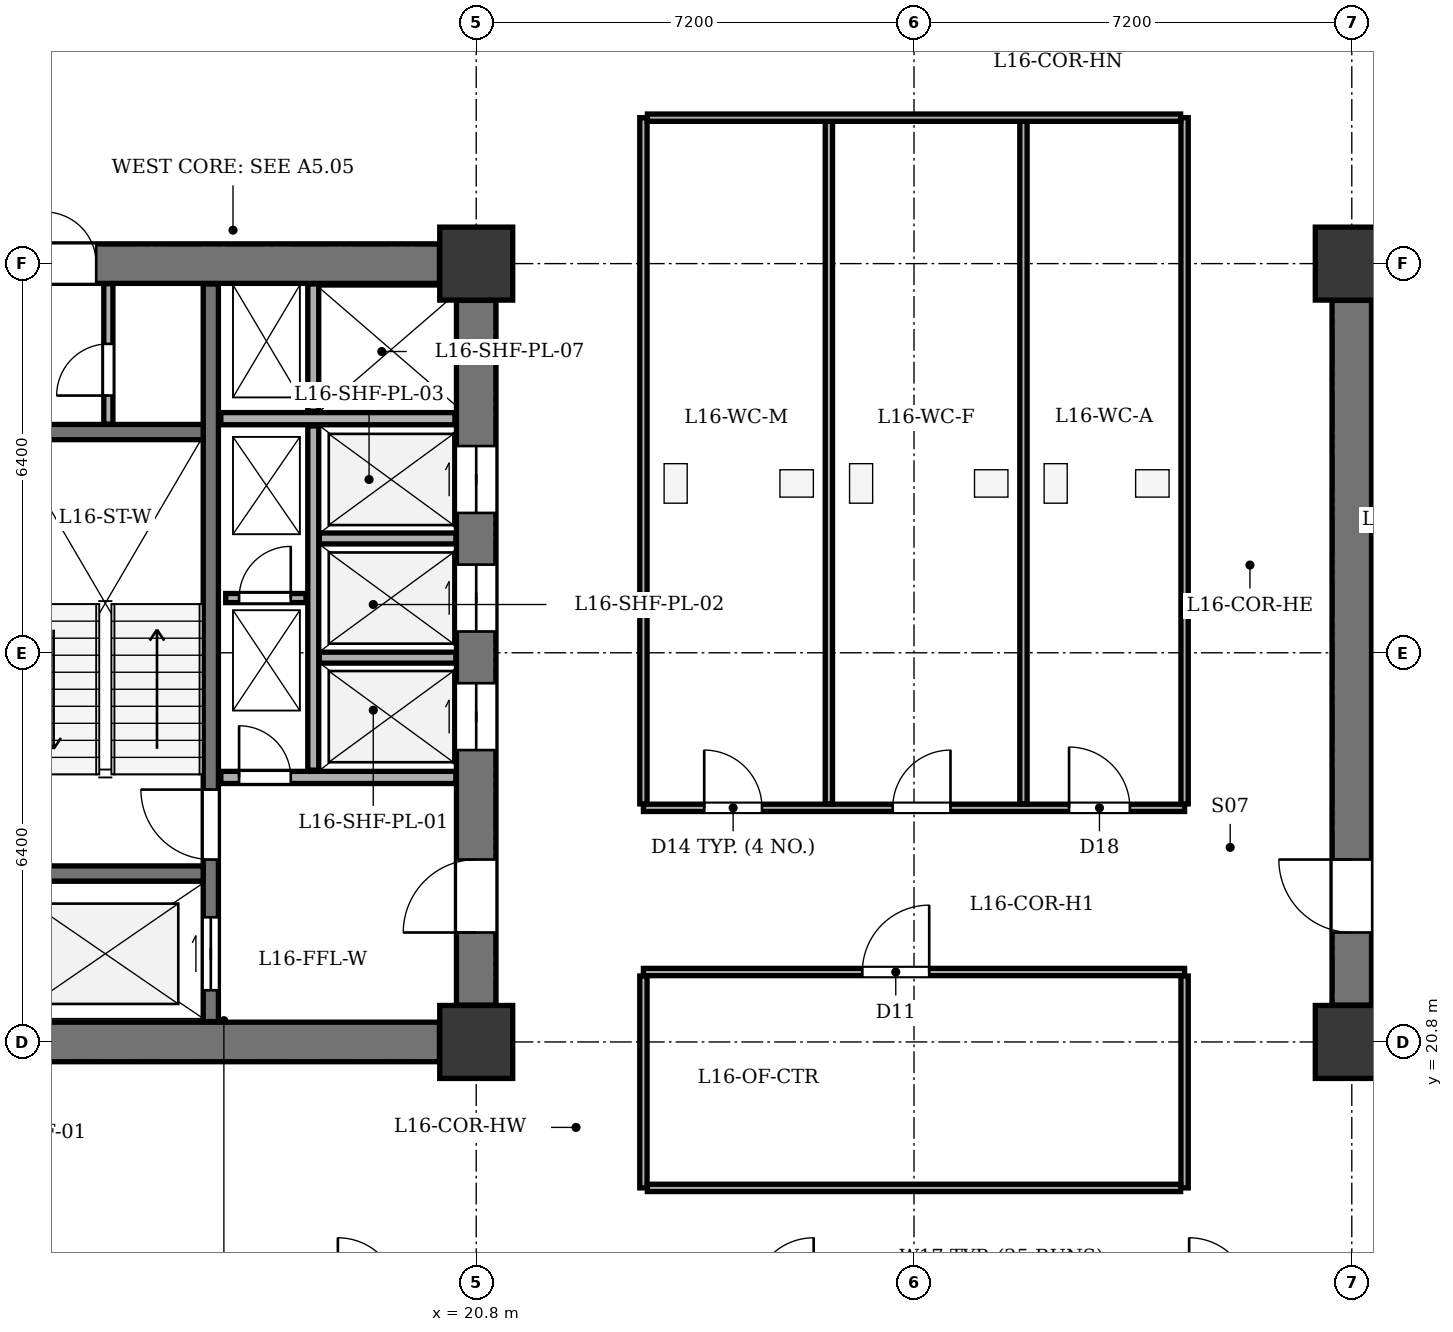
"""IFC4 building model, lengths in metres.
Left out: names, types, materials, properties, quantities, classifications, styles, units other than length and angle.
Written with IfcOpenShell. Run it as: python <this file> out.ifc"""

import sys

from ifc_helpers import new_model, si_unit, direction, frame, frame_2d, origin, origin_2d, place, context, subcontext, project, spatial, rectangle, extrude, element, fill, save


model = new_model("IFC4")
c1 = context("Model", 3, precision=1e-05, world=origin(), true_north=direction((0.0, 1.0)))
c2 = subcontext(c1, "Body", "Model", "MODEL_VIEW")
j1 = project(units=[si_unit("LENGTHUNIT", "METRE"), si_unit("PLANEANGLEUNIT", "RADIAN")], contexts=[c1])
p1 = place(None, origin())
s1 = spatial("IfcSite", under=j1, at=p1, CompositionType="ELEMENT")
p2 = place(p1, origin())
s2 = spatial("IfcBuilding", under=s1, at=p2, CompositionType="ELEMENT")
p3 = place(p2, frame((0.0, 0.0, 67.2)))
s3 = spatial("IfcBuildingStorey", under=s2, at=p3, CompositionType="ELEMENT", Elevation=67.2)
for number, where, z_axis, x_axis in (
    (1, (20.8, 20.8, 0.0), (0.0, 0.0, 1.0), (1.0, 0.0, 0.0)),
    (2, (20.8, 33.6, 0.0), (0.0, 0.0, 1.0), (1.0, 0.0, 0.0)),
    (3, (35.2, 20.8, 0.0), (0.0, 0.0, 1.0), (1.0, 0.0, 0.0)),
    (4, (35.2, 33.6, 0.0), (0.0, 0.0, 1.0), (1.0, 0.0, 0.0)),
):
    element("IfcColumn", number, at=place(p3, frame(where, z_axis=z_axis, x_axis=x_axis)), inside=s3, PredefinedType="COLUMN", context=c2, shape_type="SweptSolid", body=[
        extrude(rectangle(XDim=1.2, YDim=1.2, at=origin_2d()), origin(), (0.0, 0.0, 1.0), 3.9),
    ])
p4 = place(p3, frame((13.405, 20.8, 0.0), z_axis=(0.0, 0.0, 1.0), x_axis=(1.0, 0.0, 0.0)))
e5 = element("IfcWall", 5, at=p4, inside=s3, PredefinedType="SHEAR", context=c2, shape_type="SweptSolid", body=[
    extrude(rectangle(XDim=6.79, YDim=0.65, at=frame_2d((3.395, 0.0))), origin(), (0.0, 0.0, 1.0), 3.45),
])
p5 = place(p3, frame((13.405, 33.6, 0.0), z_axis=(0.0, 0.0, 1.0), x_axis=(1.0, 0.0, 0.0)))
e6 = element("IfcWall", 6, at=p5, inside=s3, PredefinedType="SHEAR", context=c2, shape_type="SweptSolid", body=[
    extrude(rectangle(XDim=6.79, YDim=0.65, at=frame_2d((3.395, 0.0))), origin(), (0.0, 0.0, 1.0), 3.45),
])
p6 = place(p5, frame((0.295, 0.0, 0.0)))
e7 = element("IfcOpeningElement", 7, at=p6, cuts=e6, PredefinedType="OPENING", context=c2, shape_type="SweptSolid", body=[
    extrude(rectangle(XDim=0.85, YDim=2.02, at=frame_2d((0.425, 1.01))), frame((0.0, 0.335, 0.0), z_axis=(0.0, -1.0, 0.0), x_axis=(1.0, 0.0, 0.0)), (0.0, 0.0, 1.0), 0.67),
])
p7 = place(p3, frame((20.8, 21.405, 0.0), z_axis=(0.0, 0.0, 1.0), x_axis=(0.0, 1.0, 0.0)))
e8 = element("IfcWall", 8, at=p7, inside=s3, PredefinedType="SHEAR", context=c2, shape_type="SweptSolid", body=[
    extrude(rectangle(XDim=11.59, YDim=0.65, at=frame_2d((5.795, 0.0))), origin(), (0.0, 0.0, 1.0), 3.45),
])
p8 = place(p7, frame((1.195, 0.0, 0.0)))
e9 = element("IfcOpeningElement", 9, at=p8, cuts=e8, PredefinedType="OPENING", context=c2, shape_type="SweptSolid", body=[
    extrude(rectangle(XDim=1.2, YDim=2.15, at=frame_2d((0.6, 1.075))), frame((0.0, 0.335, 0.0), z_axis=(0.0, -1.0, 0.0), x_axis=(1.0, 0.0, 0.0)), (0.0, 0.0, 1.0), 0.67),
])
p9 = place(p7, frame((4.195, 0.0, 0.0)))
e10 = element("IfcOpeningElement", 10, at=p9, cuts=e8, PredefinedType="OPENING", context=c2, shape_type="SweptSolid", body=[
    extrude(rectangle(XDim=1.1, YDim=2.1, at=frame_2d((0.55, 1.05))), frame((0.0, 0.335, 0.0), z_axis=(0.0, -1.0, 0.0), x_axis=(1.0, 0.0, 0.0)), (0.0, 0.0, 1.0), 0.67),
])
p10 = place(p7, frame((6.145, 0.0, 0.0)))
e11 = element("IfcOpeningElement", 11, at=p10, cuts=e8, PredefinedType="OPENING", context=c2, shape_type="SweptSolid", body=[
    extrude(rectangle(XDim=1.1, YDim=2.1, at=frame_2d((0.55, 1.05))), frame((0.0, 0.335, 0.0), z_axis=(0.0, -1.0, 0.0), x_axis=(1.0, 0.0, 0.0)), (0.0, 0.0, 1.0), 0.67),
])
p11 = place(p7, frame((8.095, 0.0, 0.0)))
e12 = element("IfcOpeningElement", 12, at=p11, cuts=e8, PredefinedType="OPENING", context=c2, shape_type="SweptSolid", body=[
    extrude(rectangle(XDim=1.1, YDim=2.1, at=frame_2d((0.55, 1.05))), frame((0.0, 0.335, 0.0), z_axis=(0.0, -1.0, 0.0), x_axis=(1.0, 0.0, 0.0)), (0.0, 0.0, 1.0), 0.67),
])
p12 = place(p3, frame((16.435, 21.135, 0.0), z_axis=(0.0, 0.0, 1.0), x_axis=(0.0, 1.0, 0.0)))
e13 = element("IfcWall", 13, at=p12, inside=s3, PredefinedType="SHEAR", context=c2, shape_type="SweptSolid", body=[
    extrude(rectangle(XDim=12.13, YDim=0.25, at=frame_2d((6.065, 0.0))), origin(), (0.0, 0.0, 1.0), 3.45),
])
p13 = place(p12, frame((0.515, 0.0, 0.0)))
e14 = element("IfcOpeningElement", 14, at=p13, cuts=e13, PredefinedType="OPENING", context=c2, shape_type="SweptSolid", body=[
    extrude(rectangle(XDim=1.2, YDim=2.15, at=frame_2d((0.6, 1.075))), frame((0.0, 0.135, 0.0), z_axis=(0.0, -1.0, 0.0), x_axis=(1.0, 0.0, 0.0)), (0.0, 0.0, 1.0), 0.27),
])
p14 = place(p12, frame((2.665, 0.0, 0.0)))
e15 = element("IfcOpeningElement", 15, at=p14, cuts=e13, PredefinedType="OPENING", context=c2, shape_type="SweptSolid", body=[
    extrude(rectangle(XDim=1.15, YDim=2.15, at=frame_2d((0.575, 1.075))), frame((0.0, 0.135, 0.0), z_axis=(0.0, -1.0, 0.0), x_axis=(1.0, 0.0, 0.0)), (0.0, 0.0, 1.0), 0.27),
])
for number, where, z_axis, x_axis in (
    (16, (13.135, 23.57, 0.0), (0.0, 0.0, 1.0), (1.0, 0.0, 0.0)),
    (17, (13.135, 30.83, 0.0), (0.0, 0.0, 1.0), (1.0, 0.0, 0.0)),
):
    element("IfcWall", number, at=place(p3, frame(where, z_axis=z_axis, x_axis=x_axis)), inside=s3, PredefinedType="SHEAR", context=c2, shape_type="SweptSolid", body=[
        extrude(rectangle(XDim=3.175, YDim=0.25, at=frame_2d((1.587, 0.0))), origin(), (0.0, 0.0, 1.0), 3.45),
    ])
p15 = place(p3, frame((16.6, 25.15, 0.0), z_axis=(0.0, 0.0, 1.0), x_axis=(1.0, 0.0, 0.0)))
e18 = element("IfcWall", 18, at=p15, inside=s3, PredefinedType="SOLIDWALL", context=c2, shape_type="SweptSolid", body=[
    extrude(rectangle(XDim=3.865, YDim=0.2, at=frame_2d((1.933, 0.0))), origin(), (0.0, 0.0, 1.0), 3.45),
])
p16 = place(p15, frame((0.3, 0.0, 0.0)))
e19 = element("IfcOpeningElement", 19, at=p16, cuts=e18, PredefinedType="OPENING", context=c2, shape_type="SweptSolid", body=[
    extrude(rectangle(XDim=0.85, YDim=2.02, at=frame_2d((0.425, 1.01))), frame((0.0, 0.11, 0.0), z_axis=(0.0, -1.0, 0.0), x_axis=(1.0, 0.0, 0.0)), (0.0, 0.0, 1.0), 0.22),
])
p17 = place(p3, frame((16.6, 31.05, 0.0), z_axis=(0.0, 0.0, 1.0), x_axis=(1.0, 0.0, 0.0)))
e20 = element("IfcWall", 20, at=p17, inside=s3, PredefinedType="SOLIDWALL", context=c2, shape_type="SweptSolid", body=[
    extrude(rectangle(XDim=3.85, YDim=0.2, at=frame_2d((1.925, 0.0))), origin(), (0.0, 0.0, 1.0), 3.45),
])
p18 = place(p3, frame((18.12, 25.27, 0.0), z_axis=(0.0, 0.0, 1.0), x_axis=(0.0, 1.0, 0.0)))
e21 = element("IfcWall", 21, at=p18, inside=s3, PredefinedType="PARTITIONING", context=c2, shape_type="SweptSolid", body=[
    extrude(rectangle(XDim=5.66, YDim=0.18, at=frame_2d((2.83, 0.0))), origin(), (0.0, 0.0, 1.0), 3.45),
])
p19 = place(p3, frame((18.12, 31.17, 0.0), z_axis=(0.0, 0.0, 1.0), x_axis=(0.0, 1.0, 0.0)))
e22 = element("IfcWall", 22, at=p19, inside=s3, PredefinedType="PARTITIONING", context=c2, shape_type="SweptSolid", body=[
    extrude(rectangle(XDim=2.095, YDim=0.18, at=frame_2d((1.047, 0.0))), origin(), (0.0, 0.0, 1.0), 3.45),
])
for number, where, z_axis, x_axis in (
    (23, (18.22, 27.12, 0.0), (0.0, 0.0, 1.0), (1.0, 0.0, 0.0)),
    (24, (18.22, 29.08, 0.0), (0.0, 0.0, 1.0), (1.0, 0.0, 0.0)),
):
    element("IfcWall", number, at=place(p3, frame(where, z_axis=z_axis, x_axis=x_axis)), inside=s3, PredefinedType="PARTITIONING", context=c2, shape_type="SweptSolid", body=[
        extrude(rectangle(XDim=2.245, YDim=0.18, at=frame_2d((1.123, 0.0))), origin(), (0.0, 0.0, 1.0), 3.45),
    ])
p20 = place(p3, frame((35.2, 21.405, 0.0), z_axis=(0.0, 0.0, 1.0), x_axis=(0.0, 1.0, 0.0)))
e25 = element("IfcWall", 25, at=p20, inside=s3, PredefinedType="SHEAR", context=c2, shape_type="SweptSolid", body=[
    extrude(rectangle(XDim=11.59, YDim=0.65, at=frame_2d((5.795, 0.0))), origin(), (0.0, 0.0, 1.0), 3.45),
])
p21 = place(p20, frame((1.195, 0.0, 0.0)))
e26 = element("IfcOpeningElement", 26, at=p21, cuts=e25, PredefinedType="OPENING", context=c2, shape_type="SweptSolid", body=[
    extrude(rectangle(XDim=1.2, YDim=2.15, at=frame_2d((0.6, 1.075))), frame((0.0, 0.335, 0.0), z_axis=(0.0, -1.0, 0.0), x_axis=(1.0, 0.0, 0.0)), (0.0, 0.0, 1.0), 0.67),
])
p22 = place(p3, frame((35.535, 25.15, 0.0), z_axis=(0.0, 0.0, 1.0), x_axis=(1.0, 0.0, 0.0)))
e27 = element("IfcWall", 27, at=p22, inside=s3, PredefinedType="SOLIDWALL", context=c2, shape_type="SweptSolid", body=[
    extrude(rectangle(XDim=3.865, YDim=0.2, at=frame_2d((1.933, 0.0))), origin(), (0.0, 0.0, 1.0), 3.45),
])
for number, where, z_axis, x_axis in (
    (28, (35.535, 27.12, 0.0), (0.0, 0.0, 1.0), (1.0, 0.0, 0.0)),
    (29, (35.535, 29.08, 0.0), (0.0, 0.0, 1.0), (1.0, 0.0, 0.0)),
):
    element("IfcWall", number, at=place(p3, frame(where, z_axis=z_axis, x_axis=x_axis)), inside=s3, PredefinedType="PARTITIONING", context=c2, shape_type="SweptSolid", body=[
        extrude(rectangle(XDim=2.245, YDim=0.18, at=frame_2d((1.123, 0.0))), origin(), (0.0, 0.0, 1.0), 3.45),
    ])
p23 = place(p3, frame((14.75, 30.96, 0.0), z_axis=(0.0, 0.0, 1.0), x_axis=(0.0, 1.0, 0.0)))
e30 = element("IfcWall", 30, at=p23, inside=s3, PredefinedType="PARTITIONING", context=c2, shape_type="SweptSolid", body=[
    extrude(rectangle(XDim=2.31, YDim=0.15, at=frame_2d((1.155, 0.0))), origin(), (0.0, 0.0, 1.0), 3.45),
])
p24 = place(p23, frame((0.47, 0.0, 0.0)))
e31 = element("IfcOpeningElement", 31, at=p24, cuts=e30, PredefinedType="OPENING", context=c2, shape_type="SweptSolid", body=[
    extrude(rectangle(XDim=0.85, YDim=2.02, at=frame_2d((0.425, 1.01))), frame((0.0, 0.085, 0.0), z_axis=(0.0, -1.0, 0.0), x_axis=(1.0, 0.0, 0.0)), (0.0, 0.0, 1.0), 0.17),
])
p25 = place(p3, frame((16.68, 28.1, 0.0), z_axis=(0.0, 0.0, 1.0), x_axis=(1.0, 0.0, 0.0)))
e32 = element("IfcWall", 32, at=p25, inside=s3, PredefinedType="PARTITIONING", context=c2, shape_type="SweptSolid", body=[
    extrude(rectangle(XDim=1.32, YDim=0.15, at=frame_2d((0.66, 0.0))), origin(), (0.0, 0.0, 1.0), 3.45),
])
p26 = place(p25, frame((0.22, 0.0, 0.0)))
e33 = element("IfcOpeningElement", 33, at=p26, cuts=e32, PredefinedType="OPENING", context=c2, shape_type="SweptSolid", body=[
    extrude(rectangle(XDim=0.85, YDim=2.02, at=frame_2d((0.425, 1.01))), frame((0.0, 0.085, 0.0), z_axis=(0.0, -1.0, 0.0), x_axis=(1.0, 0.0, 0.0)), (0.0, 0.0, 1.0), 0.17),
])
p27 = place(p3, frame((23.55, 24.65, 0.0), z_axis=(0.0, 0.0, 1.0), x_axis=(1.0, 0.0, 0.0)))
e34 = element("IfcWall", 34, at=p27, inside=s3, PredefinedType="PARTITIONING", context=c2, shape_type="SweptSolid", body=[
    extrude(rectangle(XDim=8.9, YDim=0.12, at=frame_2d((4.45, 0.0))), origin(), (0.0, 0.0, 1.0), 2.885),
])
p28 = place(p27, frame((1.0, 0.0, 0.0)))
e35 = element("IfcOpeningElement", 35, at=p28, cuts=e34, PredefinedType="OPENING", context=c2, shape_type="SweptSolid", body=[
    extrude(rectangle(XDim=0.95, YDim=2.1, at=frame_2d((0.475, 1.05))), frame((0.0, 0.07, 0.0), z_axis=(0.0, -1.0, 0.0), x_axis=(1.0, 0.0, 0.0)), (0.0, 0.0, 1.0), 0.14),
])
p29 = place(p27, frame((4.1, 0.0, 0.0)))
e36 = element("IfcOpeningElement", 36, at=p29, cuts=e34, PredefinedType="OPENING", context=c2, shape_type="SweptSolid", body=[
    extrude(rectangle(XDim=0.95, YDim=2.1, at=frame_2d((0.475, 1.05))), frame((0.0, 0.07, 0.0), z_axis=(0.0, -1.0, 0.0), x_axis=(1.0, 0.0, 0.0)), (0.0, 0.0, 1.0), 0.14),
])
p30 = place(p27, frame((7.0, 0.0, 0.0)))
e37 = element("IfcOpeningElement", 37, at=p30, cuts=e34, PredefinedType="OPENING", context=c2, shape_type="SweptSolid", body=[
    extrude(rectangle(XDim=1.0, YDim=2.1, at=frame_2d((0.5, 1.05))), frame((0.0, 0.07, 0.0), z_axis=(0.0, -1.0, 0.0), x_axis=(1.0, 0.0, 0.0)), (0.0, 0.0, 1.0), 0.14),
])
for number, where, z_axis, x_axis in (
    (38, (23.55, 24.715, 0.0), (0.0, 0.0, 1.0), (0.0, 1.0, 0.0)),
    (39, (32.45, 24.715, 0.0), (0.0, 0.0, 1.0), (0.0, 1.0, 0.0)),
    (40, (26.6, 24.715, 0.0), (0.0, 0.0, 1.0), (0.0, 1.0, 0.0)),
):
    element("IfcWall", number, at=place(p3, frame(where, z_axis=z_axis, x_axis=x_axis)), inside=s3, PredefinedType="PARTITIONING", context=c2, shape_type="SweptSolid", body=[
        extrude(rectangle(XDim=11.285, YDim=0.12, at=frame_2d((5.643, 0.0))), origin(), (0.0, 0.0, 1.0), 3.45),
    ])
p31 = place(p3, frame((29.8, 24.715, 0.0), z_axis=(0.0, 0.0, 1.0), x_axis=(0.0, 1.0, 0.0)))
e41 = element("IfcWall", 41, at=p31, inside=s3, PredefinedType="PARTITIONING", context=c2, shape_type="SweptSolid", body=[
    extrude(rectangle(XDim=11.285, YDim=0.12, at=frame_2d((5.643, 0.0))), origin(), (0.0, 0.0, 1.0), 2.885),
])
p32 = place(p3, frame((23.615, 36.0, 0.0), z_axis=(0.0, 0.0, 1.0), x_axis=(1.0, 0.0, 0.0)))
e42 = element("IfcWall", 42, at=p32, inside=s3, PredefinedType="PARTITIONING", context=c2, shape_type="SweptSolid", body=[
    extrude(rectangle(XDim=8.77, YDim=0.12, at=frame_2d((4.385, 0.0))), origin(), (0.0, 0.0, 1.0), 3.45),
])
p33 = place(p3, frame((23.55, 21.95, 0.0), z_axis=(0.0, 0.0, 1.0), x_axis=(1.0, 0.0, 0.0)))
e43 = element("IfcWall", 43, at=p33, inside=s3, PredefinedType="PARTITIONING", context=c2, shape_type="SweptSolid", body=[
    extrude(rectangle(XDim=8.9, YDim=0.12, at=frame_2d((4.45, 0.0))), origin(), (0.0, 0.0, 1.0), 2.885),
])
p34 = place(p33, frame((3.6, 0.0, 0.0)))
e44 = element("IfcOpeningElement", 44, at=p34, cuts=e43, PredefinedType="OPENING", context=c2, shape_type="SweptSolid", body=[
    extrude(rectangle(XDim=1.1, YDim=2.15, at=frame_2d((0.55, 1.075))), frame((0.0, 0.07, 0.0), z_axis=(0.0, -1.0, 0.0), x_axis=(1.0, 0.0, 0.0)), (0.0, 0.0, 1.0), 0.14),
])
for number, where, z_axis, x_axis in (
    (45, (23.55, 18.4, 0.0), (0.0, 0.0, 1.0), (0.0, 1.0, 0.0)),
    (46, (32.45, 18.4, 0.0), (0.0, 0.0, 1.0), (0.0, 1.0, 0.0)),
):
    element("IfcWall", number, at=place(p3, frame(where, z_axis=z_axis, x_axis=x_axis)), inside=s3, PredefinedType="PARTITIONING", context=c2, shape_type="SweptSolid", body=[
        extrude(rectangle(XDim=3.485, YDim=0.12, at=frame_2d((1.743, 0.0))), origin(), (0.0, 0.0, 1.0), 3.45),
    ])
p35 = place(p3, frame((23.615, 18.4, 0.0), z_axis=(0.0, 0.0, 1.0), x_axis=(1.0, 0.0, 0.0)))
e47 = element("IfcWall", 47, at=p35, inside=s3, PredefinedType="PARTITIONING", context=c2, shape_type="SweptSolid", body=[
    extrude(rectangle(XDim=8.77, YDim=0.12, at=frame_2d((4.385, 0.0))), origin(), (0.0, 0.0, 1.0), 3.45),
])
p36 = place(p6, origin())
e48 = element("IfcDoor", 48, at=p36, inside=s3, OperationType="SINGLE_SWING_LEFT", PredefinedType="DOOR", context=c2, shape_type="SweptSolid", body=[
    extrude(rectangle(XDim=0.85, YDim=2.02, at=frame_2d((0.425, 1.01))), frame((0.0, 0.025, 0.0), z_axis=(0.0, -1.0, 0.0), x_axis=(1.0, 0.0, 0.0)), (0.0, 0.0, 1.0), 0.05),
])
fill(e7, e48)
p37 = place(p8, origin())
e49 = element("IfcDoor", 49, at=p37, inside=s3, OperationType="SINGLE_SWING_LEFT", PredefinedType="DOOR", context=c2, shape_type="SweptSolid", body=[
    extrude(rectangle(XDim=1.2, YDim=2.15, at=frame_2d((0.6, 1.075))), frame((0.0, 0.025, 0.0), z_axis=(0.0, -1.0, 0.0), x_axis=(1.0, 0.0, 0.0)), (0.0, 0.0, 1.0), 0.05),
])
fill(e9, e49)
p38 = place(p9, origin())
e50 = element("IfcDoor", 50, at=p38, inside=s3, OperationType="DOUBLE_DOOR_SLIDING", PredefinedType="DOOR", context=c2, shape_type="SweptSolid", body=[
    extrude(rectangle(XDim=1.1, YDim=2.1, at=frame_2d((0.55, 1.05))), frame((0.0, 0.025, 0.0), z_axis=(0.0, -1.0, 0.0), x_axis=(1.0, 0.0, 0.0)), (0.0, 0.0, 1.0), 0.05),
])
fill(e10, e50)
p39 = place(p10, origin())
e51 = element("IfcDoor", 51, at=p39, inside=s3, OperationType="DOUBLE_DOOR_SLIDING", PredefinedType="DOOR", context=c2, shape_type="SweptSolid", body=[
    extrude(rectangle(XDim=1.1, YDim=2.1, at=frame_2d((0.55, 1.05))), frame((0.0, 0.025, 0.0), z_axis=(0.0, -1.0, 0.0), x_axis=(1.0, 0.0, 0.0)), (0.0, 0.0, 1.0), 0.05),
])
fill(e11, e51)
p40 = place(p11, origin())
e52 = element("IfcDoor", 52, at=p40, inside=s3, OperationType="DOUBLE_DOOR_SLIDING", PredefinedType="DOOR", context=c2, shape_type="SweptSolid", body=[
    extrude(rectangle(XDim=1.1, YDim=2.1, at=frame_2d((0.55, 1.05))), frame((0.0, 0.025, 0.0), z_axis=(0.0, -1.0, 0.0), x_axis=(1.0, 0.0, 0.0)), (0.0, 0.0, 1.0), 0.05),
])
fill(e12, e52)
p41 = place(p13, origin())
e53 = element("IfcDoor", 53, at=p41, inside=s3, OperationType="DOUBLE_DOOR_SLIDING", PredefinedType="DOOR", context=c2, shape_type="SweptSolid", body=[
    extrude(rectangle(XDim=1.2, YDim=2.15, at=frame_2d((0.6, 1.075))), frame((0.0, 0.025, 0.0), z_axis=(0.0, -1.0, 0.0), x_axis=(1.0, 0.0, 0.0)), (0.0, 0.0, 1.0), 0.05),
])
fill(e14, e53)
p42 = place(p14, origin())
e54 = element("IfcDoor", 54, at=p42, inside=s3, OperationType="SINGLE_SWING_RIGHT", PredefinedType="DOOR", context=c2, shape_type="SweptSolid", body=[
    extrude(rectangle(XDim=1.15, YDim=2.15, at=frame_2d((0.575, 1.075))), frame((0.0, 0.025, 0.0), z_axis=(0.0, -1.0, 0.0), x_axis=(1.0, 0.0, 0.0)), (0.0, 0.0, 1.0), 0.05),
])
fill(e15, e54)
p43 = place(p16, origin())
e55 = element("IfcDoor", 55, at=p43, inside=s3, OperationType="SINGLE_SWING_LEFT", PredefinedType="DOOR", context=c2, shape_type="SweptSolid", body=[
    extrude(rectangle(XDim=0.85, YDim=2.02, at=frame_2d((0.425, 1.01))), frame((0.0, 0.025, 0.0), z_axis=(0.0, -1.0, 0.0), x_axis=(1.0, 0.0, 0.0)), (0.0, 0.0, 1.0), 0.05),
])
fill(e19, e55)
p44 = place(p21, origin())
e56 = element("IfcDoor", 56, at=p44, inside=s3, OperationType="SINGLE_SWING_RIGHT", PredefinedType="DOOR", context=c2, shape_type="SweptSolid", body=[
    extrude(rectangle(XDim=1.2, YDim=2.15, at=frame_2d((0.6, 1.075))), frame((0.0, 0.025, 0.0), z_axis=(0.0, -1.0, 0.0), x_axis=(1.0, 0.0, 0.0)), (0.0, 0.0, 1.0), 0.05),
])
fill(e26, e56)
p45 = place(p24, origin())
e57 = element("IfcDoor", 57, at=p45, inside=s3, OperationType="SINGLE_SWING_LEFT", PredefinedType="DOOR", context=c2, shape_type="SweptSolid", body=[
    extrude(rectangle(XDim=0.85, YDim=2.02, at=frame_2d((0.425, 1.01))), frame((0.0, 0.025, 0.0), z_axis=(0.0, -1.0, 0.0), x_axis=(1.0, 0.0, 0.0)), (0.0, 0.0, 1.0), 0.05),
])
fill(e31, e57)
p46 = place(p26, origin())
e58 = element("IfcDoor", 58, at=p46, inside=s3, OperationType="SINGLE_SWING_RIGHT", PredefinedType="DOOR", context=c2, shape_type="SweptSolid", body=[
    extrude(rectangle(XDim=0.85, YDim=2.02, at=frame_2d((0.425, 1.01))), frame((0.0, 0.025, 0.0), z_axis=(0.0, -1.0, 0.0), x_axis=(1.0, 0.0, 0.0)), (0.0, 0.0, 1.0), 0.05),
])
fill(e33, e58)
p47 = place(p28, origin())
e59 = element("IfcDoor", 59, at=p47, inside=s3, OperationType="SINGLE_SWING_LEFT", PredefinedType="DOOR", context=c2, shape_type="SweptSolid", body=[
    extrude(rectangle(XDim=0.95, YDim=2.1, at=frame_2d((0.475, 1.05))), frame((0.0, 0.025, 0.0), z_axis=(0.0, -1.0, 0.0), x_axis=(1.0, 0.0, 0.0)), (0.0, 0.0, 1.0), 0.05),
])
fill(e35, e59)
p48 = place(p29, origin())
e60 = element("IfcDoor", 60, at=p48, inside=s3, OperationType="SINGLE_SWING_RIGHT", PredefinedType="DOOR", context=c2, shape_type="SweptSolid", body=[
    extrude(rectangle(XDim=0.95, YDim=2.1, at=frame_2d((0.475, 1.05))), frame((0.0, 0.025, 0.0), z_axis=(0.0, -1.0, 0.0), x_axis=(1.0, 0.0, 0.0)), (0.0, 0.0, 1.0), 0.05),
])
fill(e36, e60)
p49 = place(p30, origin())
e61 = element("IfcDoor", 61, at=p49, inside=s3, OperationType="SINGLE_SWING_LEFT", PredefinedType="DOOR", context=c2, shape_type="SweptSolid", body=[
    extrude(rectangle(XDim=1.0, YDim=2.1, at=frame_2d((0.5, 1.05))), frame((0.0, 0.025, 0.0), z_axis=(0.0, -1.0, 0.0), x_axis=(1.0, 0.0, 0.0)), (0.0, 0.0, 1.0), 0.05),
])
fill(e37, e61)
p50 = place(p34, origin())
e62 = element("IfcDoor", 62, at=p50, inside=s3, OperationType="SINGLE_SWING_RIGHT", PredefinedType="DOOR", context=c2, shape_type="SweptSolid", body=[
    extrude(rectangle(XDim=1.1, YDim=2.15, at=frame_2d((0.55, 1.075))), frame((0.0, 0.025, 0.0), z_axis=(0.0, -1.0, 0.0), x_axis=(1.0, 0.0, 0.0)), (0.0, 0.0, 1.0), 0.05),
])
fill(e44, e62)
save(model, sys.argv[1])
